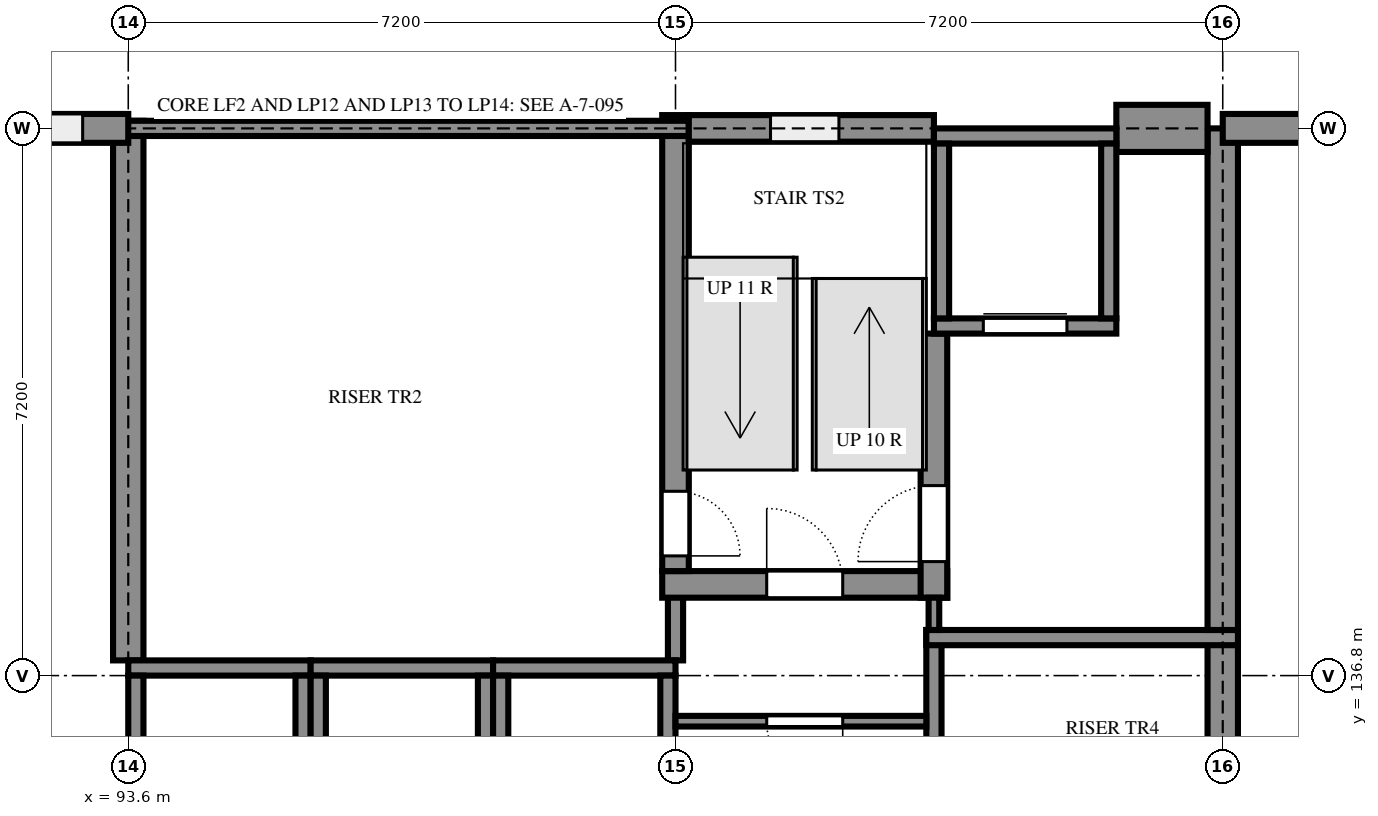
"""IFC4 building model, lengths in metres.
Left out: names, types, materials, properties, quantities, classifications, styles, units other than length and angle.
Written with IfcOpenShell. Run it as: python <this file> out.ifc"""

import sys

from ifc_helpers import new_model, si_unit, direction, frame, frame_2d, origin, place, context, subcontext, project, spatial, rectangle, extrude, element, fill, save


model = new_model("IFC4")
c1 = context("Model", 3, precision=1e-05, world=origin(), true_north=direction((0.0, 1.0)))
c2 = subcontext(c1, "Body", "Model", "MODEL_VIEW")
j1 = project(units=[si_unit("LENGTHUNIT", "METRE"), si_unit("PLANEANGLEUNIT", "RADIAN")], contexts=[c1])
p1 = place(None, origin())
s1 = spatial("IfcSite", under=j1, at=p1, CompositionType="ELEMENT")
p2 = place(p1, origin())
s2 = spatial("IfcBuilding", under=s1, at=p2, CompositionType="ELEMENT")
p3 = place(p2, frame((0.0, 0.0, 10.8)))
s3 = spatial("IfcBuildingStorey", under=s2, at=p3, CompositionType="ELEMENT", Elevation=10.8)
p4 = place(p3, frame((108.0, 134.5, 0.0), z_axis=(0.0, 0.0, 1.0), x_axis=(0.0, 1.0, 0.0)))
e1 = element("IfcWall", 1, at=p4, inside=s3, PredefinedType="SHEAR", context=c2, shape_type="SweptSolid", body=[
    extrude(rectangle(XDim=2.9, YDim=0.4, at=frame_2d((1.45, 0.0))), origin(), (0.0, 0.0, 1.0), 3.6),
])
p5 = place(p3, frame((100.8, 137.0, 0.0), z_axis=(0.0, 0.0, 1.0), x_axis=(0.0, 1.0, 0.0)))
e2 = element("IfcWall", 2, at=p5, inside=s3, PredefinedType="SHEAR", context=c2, shape_type="SweptSolid", body=[
    extrude(rectangle(XDim=1.175, YDim=0.2, at=frame_2d((0.587, 0.0))), origin(), (0.0, 0.0, 1.0), 3.6),
])
p6 = place(p3, frame((104.2, 137.4, 0.0), z_axis=(0.0, 0.0, 1.0), x_axis=(0.0, -1.0, 0.0)))
e3 = element("IfcWall", 3, at=p6, inside=s3, PredefinedType="SHEAR", context=c2, shape_type="SweptSolid", body=[
    extrude(rectangle(XDim=3.1, YDim=0.2, at=frame_2d((1.55, 0.0))), origin(), (0.0, 0.0, 1.0), 3.6),
])
p7 = place(p3, frame((108.2, 137.3, 0.0), z_axis=(0.0, 0.0, 1.0), x_axis=(-1.0, 0.0, 0.0)))
e4 = element("IfcWall", 4, at=p7, inside=s3, PredefinedType="SHEAR", context=c2, shape_type="SweptSolid", body=[
    extrude(rectangle(XDim=4.1, YDim=0.2, at=frame_2d((2.05, 0.0))), origin(), (0.0, 0.0, 1.0), 3.6),
])
p8 = place(p3, frame((108.0, 137.4, 0.0), z_axis=(0.0, 0.0, 1.0), x_axis=(0.0, 1.0, 0.0)))
e5 = element("IfcWall", 5, at=p8, inside=s3, PredefinedType="SHEAR", context=c2, shape_type="SweptSolid", body=[
    extrude(rectangle(XDim=6.6, YDim=0.4, at=frame_2d((3.3, 0.0))), origin(), (0.0, 0.0, 1.0), 3.6),
])
p9 = place(p3, frame((100.625, 138.0, 0.0), z_axis=(0.0, 0.0, 1.0), x_axis=(1.0, 0.0, 0.0)))
e6 = element("IfcWall", 6, at=p9, inside=s3, PredefinedType="SHEAR", context=c2, shape_type="SweptSolid", body=[
    extrude(rectangle(XDim=3.75, YDim=0.35, at=frame_2d((1.875, 0.0))), origin(), (0.0, 0.0, 1.0), 3.6),
])
p10 = place(p9, frame((1.375, 0.0, 0.0)))
e7 = element("IfcOpeningElement", 7, at=p10, cuts=e6, PredefinedType="OPENING", context=c2, shape_type="SweptSolid", body=[
    extrude(rectangle(XDim=1.0, YDim=2.1, at=frame_2d((0.5, 1.05))), frame((0.0, 0.185, 0.0), z_axis=(0.0, -1.0, 0.0), x_axis=(1.0, 0.0, 0.0)), (0.0, 0.0, 1.0), 0.37),
])
p11 = place(p3, frame((104.2, 137.825, 0.0), z_axis=(0.0, 0.0, 1.0), x_axis=(0.0, 1.0, 0.0)))
e8 = element("IfcWall", 8, at=p11, inside=s3, PredefinedType="SHEAR", context=c2, shape_type="SweptSolid", body=[
    extrude(rectangle(XDim=3.475, YDim=0.35, at=frame_2d((1.738, 0.0))), origin(), (0.0, 0.0, 1.0), 3.6),
])
p12 = place(p11, frame((0.475, 0.0, 0.0)))
e9 = element("IfcOpeningElement", 9, at=p12, cuts=e8, PredefinedType="OPENING", context=c2, shape_type="SweptSolid", body=[
    extrude(rectangle(XDim=1.0, YDim=2.1, at=frame_2d((0.5, 1.05))), frame((0.0, 0.185, 0.0), z_axis=(0.0, -1.0, 0.0), x_axis=(1.0, 0.0, 0.0)), (0.0, 0.0, 1.0), 0.37),
])
p13 = place(p3, frame((93.6, 144.1, 0.0), z_axis=(0.0, 0.0, 1.0), x_axis=(0.0, -1.0, 0.0)))
e10 = element("IfcWall", 10, at=p13, inside=s3, PredefinedType="SHEAR", context=c2, shape_type="SweptSolid", body=[
    extrude(rectangle(XDim=7.1, YDim=0.4, at=frame_2d((3.55, 0.0))), origin(), (0.0, 0.0, 1.0), 3.6),
])
p14 = place(p3, frame((100.8, 144.175, 0.0), z_axis=(0.0, 0.0, 1.0), x_axis=(0.0, -1.0, 0.0)))
e11 = element("IfcWall", 11, at=p14, inside=s3, PredefinedType="SHEAR", context=c2, shape_type="SweptSolid", body=[
    extrude(rectangle(XDim=6.0, YDim=0.35, at=frame_2d((3.0, 0.0))), origin(), (0.0, 0.0, 1.0), 3.6),
])
p15 = place(p14, frame((4.95, 0.0, 0.0)))
e12 = element("IfcOpeningElement", 12, at=p15, cuts=e11, PredefinedType="OPENING", context=c2, shape_type="SweptSolid", body=[
    extrude(rectangle(XDim=0.85, YDim=2.1, at=frame_2d((0.425, 1.05))), frame((0.0, 0.185, 0.0), z_axis=(0.0, -1.0, 0.0), x_axis=(1.0, 0.0, 0.0)), (0.0, 0.0, 1.0), 0.37),
])
p16 = place(p3, frame((100.975, 144.0, 0.0), z_axis=(0.0, 0.0, 1.0), x_axis=(-1.0, 0.0, 0.0)))
e13 = element("IfcWall", 13, at=p16, inside=s3, PredefinedType="SHEAR", context=c2, shape_type="SweptSolid", body=[
    extrude(rectangle(XDim=7.575, YDim=0.2, at=frame_2d((3.788, 0.0))), origin(), (0.0, 0.0, 1.0), 3.6),
])
p17 = place(p3, frame((104.2, 144.0, 0.0), z_axis=(0.0, 0.0, 1.0), x_axis=(-1.0, 0.0, 0.0)))
e14 = element("IfcWall", 14, at=p17, inside=s3, PredefinedType="SHEAR", context=c2, shape_type="SweptSolid", body=[
    extrude(rectangle(XDim=3.225, YDim=0.35, at=frame_2d((1.612, 0.0))), origin(), (0.0, 0.0, 1.0), 3.6),
])
p18 = place(p17, frame((1.25, 0.0, 0.6)))
e15 = element("IfcOpeningElement", 15, at=p18, cuts=e14, PredefinedType="OPENING", context=c2, shape_type="SweptSolid", body=[
    extrude(rectangle(XDim=0.9, YDim=2.1, at=frame_2d((0.45, 1.05))), frame((0.0, 0.185, 0.0), z_axis=(0.0, -1.0, 0.0), x_axis=(1.0, 0.0, 0.0)), (0.0, 0.0, 1.0), 0.37),
])
p19 = place(p3, frame((115.046, 144.0, 0.0), z_axis=(0.0, 0.0, 1.0), x_axis=(-1.0, 0.0, 0.0)))
e16 = element("IfcWall", 16, at=p19, inside=s3, PredefinedType="SOLIDWALL", context=c2, shape_type="SweptSolid", body=[
    extrude(rectangle(XDim=7.046, YDim=0.38, at=frame_2d((3.523, 0.0))), origin(), (0.0, 0.0, 1.0), 3.16),
])
p20 = place(p3, frame((107.8, 144.0, 0.0), z_axis=(0.0, 0.0, 1.0), x_axis=(-1.0, 0.0, 0.0)))
e17 = element("IfcWall", 17, at=p20, inside=s3, PredefinedType="SOLIDWALL", context=c2, shape_type="SweptSolid", body=[
    extrude(rectangle(XDim=1.2, YDim=0.62, at=frame_2d((0.6, 0.0))), origin(), (0.0, 0.0, 1.0), 3.46),
])
p21 = place(p3, frame((93.6, 144.0, 0.0), z_axis=(0.0, 0.0, 1.0), x_axis=(-1.0, 0.0, 0.0)))
e18 = element("IfcWall", 18, at=p21, inside=s3, PredefinedType="SOLIDWALL", context=c2, shape_type="SweptSolid", body=[
    extrude(rectangle(XDim=7.047, YDim=0.38, at=frame_2d((3.523, 0.0))), origin(), (0.0, 0.0, 1.0), 3.16),
])
p22 = place(p21, frame((4.2, 0.0, 0.6)))
e19 = element("IfcOpeningElement", 19, at=p22, cuts=e18, PredefinedType="OPENING", context=c2, shape_type="SweptSolid", body=[
    extrude(rectangle(XDim=2.4, YDim=2.4, at=frame_2d((1.2, 1.2))), frame((0.0, 0.2, 0.0), z_axis=(0.0, -1.0, 0.0), x_axis=(1.0, 0.0, 0.0)), (0.0, 0.0, 1.0), 0.4),
])
p23 = place(p21, frame((0.6, 0.0, 0.6)))
e20 = element("IfcOpeningElement", 20, at=p23, cuts=e18, PredefinedType="OPENING", context=c2, shape_type="SweptSolid", body=[
    extrude(rectangle(XDim=2.4, YDim=2.4, at=frame_2d((1.2, 1.2))), frame((0.0, 0.2, 0.0), z_axis=(0.0, -1.0, 0.0), x_axis=(1.0, 0.0, 0.0)), (0.0, 0.0, 1.0), 0.4),
])
p24 = place(p3, frame((93.6, 136.9, 0.0), z_axis=(0.0, 0.0, 1.0), x_axis=(1.0, 0.0, 0.0)))
e21 = element("IfcWall", 21, at=p24, inside=s3, PredefinedType="SHEAR", context=c2, shape_type="SweptSolid", body=[
    extrude(rectangle(XDim=2.4, YDim=0.2, at=frame_2d((1.2, 0.0))), origin(), (0.0, 0.0, 1.0), 3.6),
])
for number, where, z_axis, x_axis in (
    (22, (93.7, 134.6, 0.0), (0.0, 0.0, 1.0), (0.0, 1.0, 0.0)),
    (23, (95.9, 134.6, 0.0), (0.0, 0.0, 1.0), (0.0, 1.0, 0.0)),
):
    element("IfcWall", number, at=place(p3, frame(where, z_axis=z_axis, x_axis=x_axis)), inside=s3, PredefinedType="SHEAR", context=c2, shape_type="SweptSolid", body=[
        extrude(rectangle(XDim=2.2, YDim=0.2, at=frame_2d((1.1, 0.0))), origin(), (0.0, 0.0, 1.0), 3.6),
    ])
p25 = place(p3, frame((96.0, 136.9, 0.0), z_axis=(0.0, 0.0, 1.0), x_axis=(1.0, 0.0, 0.0)))
e24 = element("IfcWall", 24, at=p25, inside=s3, PredefinedType="SHEAR", context=c2, shape_type="SweptSolid", body=[
    extrude(rectangle(XDim=2.4, YDim=0.2, at=frame_2d((1.2, 0.0))), origin(), (0.0, 0.0, 1.0), 3.6),
])
for number, where, z_axis, x_axis in (
    (25, (96.1, 134.6, 0.0), (0.0, 0.0, 1.0), (0.0, 1.0, 0.0)),
    (26, (98.3, 134.6, 0.0), (0.0, 0.0, 1.0), (0.0, 1.0, 0.0)),
):
    element("IfcWall", number, at=place(p3, frame(where, z_axis=z_axis, x_axis=x_axis)), inside=s3, PredefinedType="SHEAR", context=c2, shape_type="SweptSolid", body=[
        extrude(rectangle(XDim=2.2, YDim=0.2, at=frame_2d((1.1, 0.0))), origin(), (0.0, 0.0, 1.0), 3.6),
    ])
p26 = place(p3, frame((98.4, 136.9, 0.0), z_axis=(0.0, 0.0, 1.0), x_axis=(1.0, 0.0, 0.0)))
e27 = element("IfcWall", 27, at=p26, inside=s3, PredefinedType="SHEAR", context=c2, shape_type="SweptSolid", body=[
    extrude(rectangle(XDim=2.4, YDim=0.2, at=frame_2d((1.2, 0.0))), origin(), (0.0, 0.0, 1.0), 3.6),
])
for number, where, z_axis, x_axis in (
    (28, (98.5, 134.6, 0.0), (0.0, 0.0, 1.0), (0.0, 1.0, 0.0)),
    (29, (100.7, 134.6, 0.0), (0.0, 0.0, 1.0), (0.0, 1.0, 0.0)),
):
    element("IfcWall", number, at=place(p3, frame(where, z_axis=z_axis, x_axis=x_axis)), inside=s3, PredefinedType="SHEAR", context=c2, shape_type="SweptSolid", body=[
        extrude(rectangle(XDim=2.2, YDim=0.2, at=frame_2d((1.1, 0.0))), origin(), (0.0, 0.0, 1.0), 3.6),
    ])
p27 = place(p3, frame((104.2, 141.4, 0.0), z_axis=(0.0, 0.0, 1.0), x_axis=(1.0, 0.0, 0.0)))
e30 = element("IfcWall", 30, at=p27, inside=s3, PredefinedType="SHEAR", context=c2, shape_type="SweptSolid", body=[
    extrude(rectangle(XDim=2.4, YDim=0.2, at=frame_2d((1.2, 0.0))), origin(), (0.0, 0.0, 1.0), 3.6),
])
p28 = place(p27, frame((0.65, 0.0, 0.0)))
e31 = element("IfcOpeningElement", 31, at=p28, cuts=e30, PredefinedType="OPENING", context=c2, shape_type="SweptSolid", body=[
    extrude(rectangle(XDim=1.1, YDim=2.1, at=frame_2d((0.55, 1.05))), frame((0.0, 0.11, 0.0), z_axis=(0.0, -1.0, 0.0), x_axis=(1.0, 0.0, 0.0)), (0.0, 0.0, 1.0), 0.22),
])
p29 = place(p3, frame((104.2, 143.9, 0.0), z_axis=(0.0, 0.0, 1.0), x_axis=(1.0, 0.0, 0.0)))
e32 = element("IfcWall", 32, at=p29, inside=s3, PredefinedType="SHEAR", context=c2, shape_type="SweptSolid", body=[
    extrude(rectangle(XDim=2.4, YDim=0.2, at=frame_2d((1.2, 0.0))), origin(), (0.0, 0.0, 1.0), 3.6),
])
for number, where, z_axis, x_axis in (
    (33, (104.3, 141.5, 0.0), (0.0, 0.0, 1.0), (0.0, 1.0, 0.0)),
    (34, (106.5, 141.5, 0.0), (0.0, 0.0, 1.0), (0.0, 1.0, 0.0)),
):
    element("IfcWall", number, at=place(p3, frame(where, z_axis=z_axis, x_axis=x_axis)), inside=s3, PredefinedType="SHEAR", context=c2, shape_type="SweptSolid", body=[
        extrude(rectangle(XDim=2.3, YDim=0.2, at=frame_2d((1.15, 0.0))), origin(), (0.0, 0.0, 1.0), 3.6),
    ])
p30 = place(p3, frame((100.8, 136.2, 0.0), z_axis=(0.0, 0.0, 1.0), x_axis=(1.0, 0.0, 0.0)))
e35 = element("IfcWall", 35, at=p30, inside=s3, PredefinedType="PARTITIONING", context=c2, shape_type="SweptSolid", body=[
    extrude(rectangle(XDim=3.3, YDim=0.14, at=frame_2d((1.65, 0.0))), origin(), (0.0, 0.0, 1.0), 3.42),
])
p31 = place(p30, frame((1.2, 0.0, 0.0)))
e36 = element("IfcOpeningElement", 36, at=p31, cuts=e35, PredefinedType="OPENING", context=c2, shape_type="SweptSolid", body=[
    extrude(rectangle(XDim=1.0, YDim=2.1, at=frame_2d((0.5, 1.05))), frame((0.0, 0.08, 0.0), z_axis=(0.0, -1.0, 0.0), x_axis=(1.0, 0.0, 0.0)), (0.0, 0.0, 1.0), 0.16),
])
p32 = place(p3, frame((104.2, 137.4, 0.0), z_axis=(0.0, 0.0, 1.0), x_axis=(0.0, 1.0, 0.0)))
e37 = element("IfcWall", 37, at=p32, inside=s3, PredefinedType="PARTITIONING", context=c2, shape_type="SweptSolid", body=[
    extrude(rectangle(XDim=0.425, YDim=0.14, at=frame_2d((0.212, 0.0))), origin(), (0.0, 0.0, 1.0), 3.42),
])
p33 = place(p23, origin())
e38 = element("IfcWindow", 38, at=p33, inside=s3, PartitioningType="SINGLE_PANEL", PredefinedType="WINDOW", context=c2, shape_type="SweptSolid", body=[
    extrude(rectangle(XDim=2.4, YDim=2.4, at=frame_2d((1.2, 1.2))), frame((0.0, 0.03, 0.0), z_axis=(0.0, -1.0, 0.0), x_axis=(1.0, 0.0, 0.0)), (0.0, 0.0, 1.0), 0.06),
])
fill(e20, e38)
p34 = place(p18, origin())
e39 = element("IfcWindow", 39, at=p34, inside=s3, PartitioningType="SINGLE_PANEL", PredefinedType="WINDOW", context=c2, shape_type="SweptSolid", body=[
    extrude(rectangle(XDim=0.9, YDim=2.1, at=frame_2d((0.45, 1.05))), frame((0.0, 0.03, 0.0), z_axis=(0.0, -1.0, 0.0), x_axis=(1.0, 0.0, 0.0)), (0.0, 0.0, 1.0), 0.06),
])
fill(e15, e39)
p35 = place(p28, origin())
e40 = element("IfcDoor", 40, at=p35, inside=s3, OperationType="SLIDING_TO_LEFT", PredefinedType="DOOR", context=c2, shape_type="SweptSolid", body=[
    extrude(rectangle(XDim=1.1, YDim=2.1, at=frame_2d((0.55, 1.05))), frame((0.0, 0.025, 0.0), z_axis=(0.0, -1.0, 0.0), x_axis=(1.0, 0.0, 0.0)), (0.0, 0.0, 1.0), 0.05),
])
fill(e31, e40)
p36 = place(p31, frame((1.0, 0.0, 0.0), z_axis=(0.0, 0.0, 1.0), x_axis=(-1.0, 0.0, 0.0)))
e41 = element("IfcDoor", 41, at=p36, inside=s3, OperationType="SINGLE_SWING_RIGHT", PredefinedType="DOOR", context=c2, shape_type="SweptSolid", body=[
    extrude(rectangle(XDim=1.0, YDim=2.1, at=frame_2d((0.5, 1.05))), frame((0.0, 0.025, 0.0), z_axis=(0.0, -1.0, 0.0), x_axis=(1.0, 0.0, 0.0)), (0.0, 0.0, 1.0), 0.05),
])
fill(e36, e41)
p37 = place(p10, origin())
e42 = element("IfcDoor", 42, at=p37, inside=s3, OperationType="SINGLE_SWING_RIGHT", PredefinedType="DOOR", context=c2, shape_type="SweptSolid", body=[
    extrude(rectangle(XDim=1.0, YDim=2.1, at=frame_2d((0.5, 1.05))), frame((0.0, 0.025, 0.0), z_axis=(0.0, -1.0, 0.0), x_axis=(1.0, 0.0, 0.0)), (0.0, 0.0, 1.0), 0.05),
])
fill(e7, e42)
p38 = place(p15, origin())
e43 = element("IfcDoor", 43, at=p38, inside=s3, OperationType="SINGLE_SWING_LEFT", PredefinedType="DOOR", context=c2, shape_type="SweptSolid", body=[
    extrude(rectangle(XDim=0.85, YDim=2.1, at=frame_2d((0.425, 1.05))), frame((0.0, 0.025, 0.0), z_axis=(0.0, -1.0, 0.0), x_axis=(1.0, 0.0, 0.0)), (0.0, 0.0, 1.0), 0.05),
])
fill(e12, e43)
p39 = place(p12, origin())
e44 = element("IfcDoor", 44, at=p39, inside=s3, OperationType="SINGLE_SWING_RIGHT", PredefinedType="DOOR", context=c2, shape_type="SweptSolid", body=[
    extrude(rectangle(XDim=1.0, YDim=2.1, at=frame_2d((0.5, 1.05))), frame((0.0, 0.025, 0.0), z_axis=(0.0, -1.0, 0.0), x_axis=(1.0, 0.0, 0.0)), (0.0, 0.0, 1.0), 0.05),
])
fill(e9, e44)
save(model, sys.argv[1])
